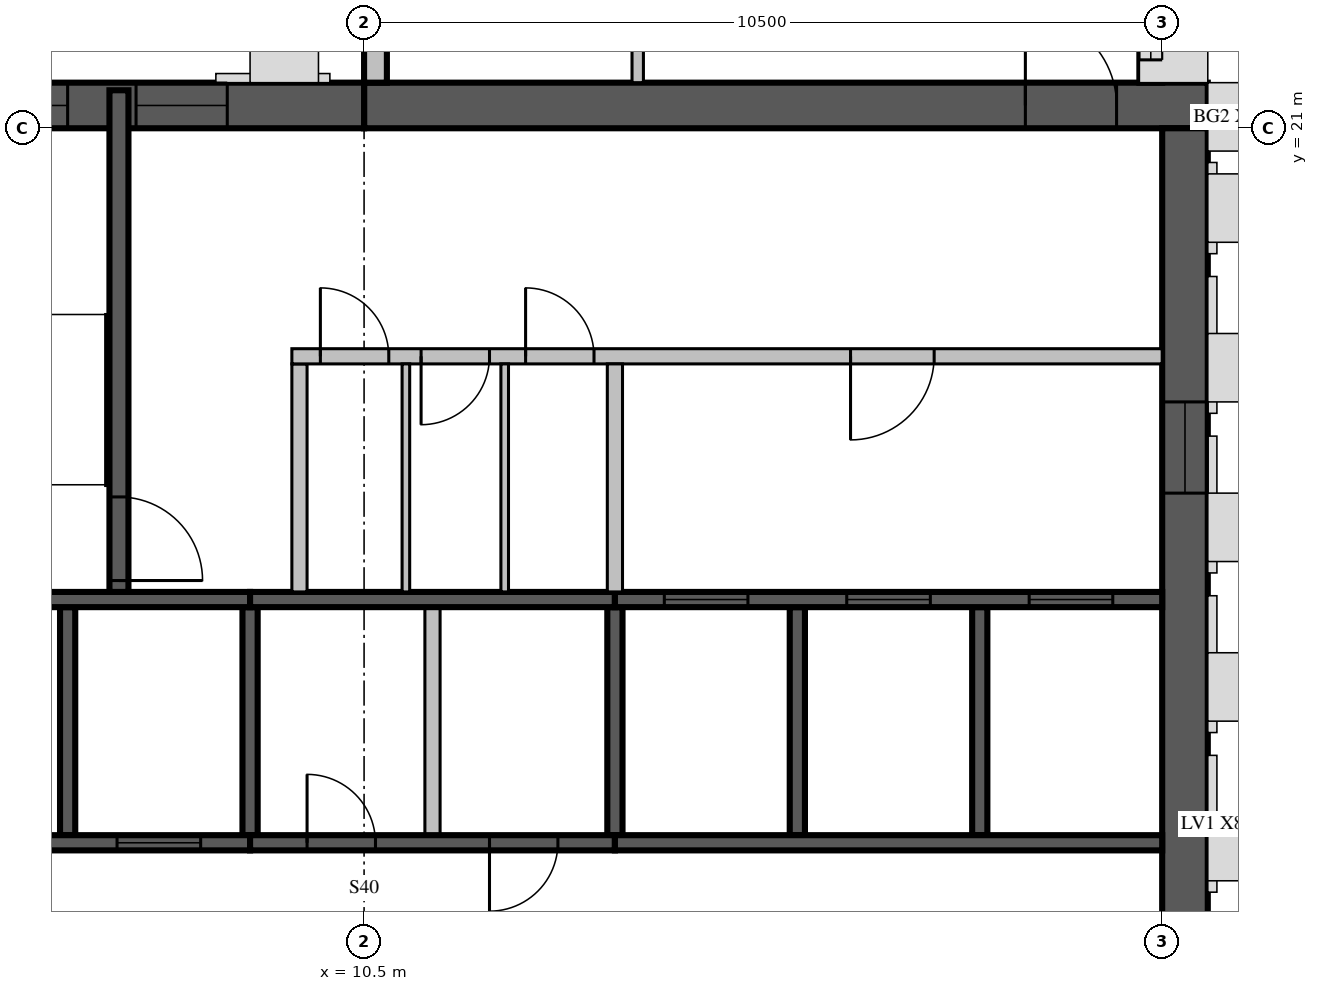
"""IFC4 building model, lengths in metres.
Left out: names, types, materials, properties, quantities, classifications, styles, units other than length and angle.
Written with IfcOpenShell. Run it as: python <this file> out.ifc"""

import sys

from ifc_helpers import new_model, si_unit, direction, frame, frame_2d, origin, place, context, subcontext, project, spatial, rectangle, extrude, source, transform, mapped, element, fill, save


model = new_model("IFC4")
c1 = context("Model", 3, precision=1e-05, world=origin(), true_north=direction((0.0, 1.0)))
c2 = subcontext(c1, "Body", "Model", "MODEL_VIEW")
j1 = project(units=[si_unit("LENGTHUNIT", "METRE"), si_unit("PLANEANGLEUNIT", "RADIAN")], contexts=[c1])
p1 = place(None, origin())
s1 = spatial("IfcSite", under=j1, at=p1, CompositionType="ELEMENT")
p2 = place(p1, origin())
s2 = spatial("IfcBuilding", under=s1, at=p2, CompositionType="ELEMENT")
p3 = place(p2, frame((0.0, 0.0, 358.0)))
s3 = spatial("IfcBuildingStorey", under=s2, at=p3, CompositionType="ELEMENT", Elevation=358.0)
m1 = source(origin(), c2, "Body", "SweptSolid", [
    extrude(rectangle(XDim=11.1, YDim=0.6, at=frame_2d((5.55, 0.0))), origin(), (0.0, 0.0, 1.0), 3.5),
])
p4 = place(p3, frame((10.5, 21.3, 0.0), z_axis=(0.0, 0.0, 1.0), x_axis=(1.0, 0.0, 0.0)))
e1 = element("IfcWall", 1, at=p4, inside=s3, PredefinedType="SHEAR", context=c2, shape_type="MappedRepresentation", body=[
    mapped(m1, transform((0.0, 0.0, 0.0), scale=1.0)),
])
m2 = source(origin(), c2, "Body", "SweptSolid", [
    extrude(rectangle(XDim=1.2, YDim=2.1, at=frame_2d((0.6, 1.05))), frame((0.0, 0.31, 0.0), z_axis=(0.0, -1.0, 0.0), x_axis=(1.0, 0.0, 0.0)), (0.0, 0.0, 1.0), 0.62),
])
p5 = place(p4, frame((8.7, 0.0, 0.0)))
e2 = element("IfcOpeningElement", 2, at=p5, cuts=e1, PredefinedType="OPENING", context=c2, shape_type="MappedRepresentation", body=[
    mapped(m2, transform((0.0, 0.0, 0.0), scale=1.0)),
])
m3 = source(origin(), c2, "Body", "SweptSolid", [
    extrude(rectangle(XDim=10.5, YDim=0.6, at=frame_2d((5.25, 0.0))), origin(), (0.0, 0.0, 1.0), 3.5),
])
p6 = place(p3, frame((21.3, 10.5, 0.0), z_axis=(0.0, 0.0, 1.0), x_axis=(0.0, 1.0, 0.0)))
e3 = element("IfcWall", 3, at=p6, inside=s3, PredefinedType="SHEAR", context=c2, shape_type="MappedRepresentation", body=[
    mapped(m3, transform((0.0, 0.0, 0.0), scale=1.0)),
])
m4 = source(origin(), c2, "Body", "SweptSolid", [
    extrude(rectangle(XDim=1.2, YDim=2.4, at=frame_2d((0.6, 1.2))), frame((0.0, 0.31, 0.0), z_axis=(0.0, -1.0, 0.0), x_axis=(1.0, 0.0, 0.0)), (0.0, 0.0, 1.0), 0.62),
])
p7 = place(p6, frame((5.7, 0.0, 0.6)))
e4 = element("IfcOpeningElement", 4, at=p7, cuts=e3, PredefinedType="OPENING", context=c2, shape_type="MappedRepresentation", body=[
    mapped(m4, transform((0.0, 0.0, 0.0), scale=1.0)),
])
m5 = source(origin(), c2, "Body", "SweptSolid", [
    extrude(rectangle(XDim=6.6, YDim=0.6, at=frame_2d((3.3, 0.0))), origin(), (0.0, 0.0, 1.0), 3.5),
])
p8 = place(p3, frame((3.9, 21.3, 0.0), z_axis=(0.0, 0.0, 1.0), x_axis=(1.0, 0.0, 0.0)))
e5 = element("IfcWall", 5, at=p8, inside=s3, PredefinedType="SHEAR", context=c2, shape_type="MappedRepresentation", body=[
    mapped(m5, transform((0.0, 0.0, 0.0), scale=1.0)),
])
p9 = place(p8, frame((1.5, 0.0, 0.6)))
e6 = element("IfcOpeningElement", 6, at=p9, cuts=e5, PredefinedType="OPENING", context=c2, shape_type="MappedRepresentation", body=[
    mapped(m4, transform((0.0, 0.0, 0.0), scale=1.0)),
])
p10 = place(p8, frame((3.6, 0.0, 0.6)))
e7 = element("IfcOpeningElement", 7, at=p10, cuts=e5, PredefinedType="OPENING", context=c2, shape_type="MappedRepresentation", body=[
    mapped(m4, transform((0.0, 0.0, 0.0), scale=1.0)),
])
m6 = source(origin(), c2, "Body", "SweptSolid", [
    extrude(rectangle(XDim=7.5, YDim=0.3, at=frame_2d((3.75, 0.0))), origin(), (0.0, 0.0, 1.0), 3.1),
])
p11 = place(p3, frame((20.85, 21.6, 0.0), z_axis=(0.0, 0.0, 1.0), x_axis=(0.0, 1.0, 0.0)))
e8 = element("IfcWall", 8, at=p11, inside=s3, PredefinedType="STANDARD", context=c2, shape_type="MappedRepresentation", body=[
    mapped(m6, transform((0.0, 0.0, 0.0), scale=1.0)),
])
m7 = source(origin(), c2, "Body", "SweptSolid", [
    extrude(rectangle(XDim=2.4, YDim=2.0, at=frame_2d((1.2, 1.0))), frame((0.0, 0.16, 0.0), z_axis=(0.0, -1.0, 0.0), x_axis=(1.0, 0.0, 0.0)), (0.0, 0.0, 1.0), 0.32),
])
p12 = place(p11, frame((0.3, 0.0, 0.6)))
e9 = element("IfcOpeningElement", 9, at=p12, cuts=e8, PredefinedType="OPENING", context=c2, shape_type="MappedRepresentation", body=[
    mapped(m7, transform((0.0, 0.0, 0.0), scale=1.0)),
])
m8 = source(origin(), c2, "Body", "SweptSolid", [
    extrude(rectangle(XDim=3.0, YDim=2.0, at=frame_2d((1.5, 1.0))), frame((0.0, 0.16, 0.0), z_axis=(0.0, -1.0, 0.0), x_axis=(1.0, 0.0, 0.0)), (0.0, 0.0, 1.0), 0.32),
])
p13 = place(p11, frame((4.2, 0.0, 0.6)))
e10 = element("IfcOpeningElement", 10, at=p13, cuts=e8, PredefinedType="OPENING", context=c2, shape_type="MappedRepresentation", body=[
    mapped(m8, transform((0.0, 0.0, 0.0), scale=1.0)),
])
m9 = source(origin(), c2, "Body", "SweptSolid", [
    extrude(rectangle(XDim=5.28, YDim=0.3, at=frame_2d((2.64, 0.0))), origin(), (0.0, 0.0, 1.0), 3.1),
])
p14 = place(p3, frame((10.65, 26.88, 0.0), z_axis=(0.0, 0.0, 1.0), x_axis=(0.0, -1.0, 0.0)))
e11 = element("IfcWall", 11, at=p14, inside=s3, PredefinedType="STANDARD", context=c2, shape_type="MappedRepresentation", body=[
    mapped(m9, transform((0.0, 0.0, 0.0), scale=1.0)),
])
m10 = source(origin(), c2, "Body", "SweptSolid", [
    extrude(rectangle(XDim=3.6, YDim=2.0, at=frame_2d((1.8, 1.0))), frame((0.0, 0.16, 0.0), z_axis=(0.0, -1.0, 0.0), x_axis=(1.0, 0.0, 0.0)), (0.0, 0.0, 1.0), 0.32),
])
p15 = place(p14, frame((1.14, 0.0, 0.6)))
e12 = element("IfcOpeningElement", 12, at=p15, cuts=e11, PredefinedType="OPENING", context=c2, shape_type="MappedRepresentation", body=[
    mapped(m10, transform((0.0, 0.0, 0.0), scale=1.0)),
])
m11 = source(origin(), c2, "Body", "SweptSolid", [
    extrude(rectangle(XDim=3.0, YDim=0.2, at=frame_2d((1.5, 0.0))), origin(), (0.0, 0.0, 1.0), 3.5),
])
p16 = place(p3, frame((6.6, 11.7, 0.0), z_axis=(0.0, 0.0, 1.0), x_axis=(0.0, 1.0, 0.0)))
e13 = element("IfcWall", 13, at=p16, inside=s3, PredefinedType="SOLIDWALL", context=c2, shape_type="MappedRepresentation", body=[
    mapped(m11, transform((0.0, 0.0, 0.0), scale=1.0)),
])
m12 = source(origin(), c2, "Body", "SweptSolid", [
    extrude(rectangle(XDim=3.0, YDim=0.2, at=frame_2d((1.5, 0.0))), origin(), (0.0, 0.0, 1.0), 3.1),
])
for number, where, z_axis, x_axis in (
    (14, (9.0, 11.7, 0.0), (0.0, 0.0, 1.0), (0.0, 1.0, 0.0)),
    (15, (13.8, 11.7, 0.0), (0.0, 0.0, 1.0), (0.0, 1.0, 0.0)),
):
    element("IfcWall", number, at=place(p3, frame(where, z_axis=z_axis, x_axis=x_axis)), inside=s3, PredefinedType="SOLIDWALL", context=c2, shape_type="MappedRepresentation", body=[
        mapped(m12, transform((0.0, 0.0, 0.0), scale=1.0)),
    ])
for number, where, z_axis, x_axis in (
    (16, (16.2, 11.7, 0.0), (0.0, 0.0, 1.0), (0.0, 1.0, 0.0)),
    (17, (18.6, 11.7, 0.0), (0.0, 0.0, 1.0), (0.0, 1.0, 0.0)),
):
    element("IfcWall", number, at=place(p3, frame(where, z_axis=z_axis, x_axis=x_axis)), inside=s3, PredefinedType="SOLIDWALL", context=c2, shape_type="MappedRepresentation", body=[
        mapped(m11, transform((0.0, 0.0, 0.0), scale=1.0)),
    ])
m13 = source(origin(), c2, "Body", "SweptSolid", [
    extrude(rectangle(XDim=3.0, YDim=0.2, at=frame_2d((1.5, 0.0))), origin(), (0.0, 0.0, 1.0), 3.1),
])
p17 = place(p3, frame((11.4, 11.7, 0.0), z_axis=(0.0, 0.0, 1.0), x_axis=(0.0, 1.0, 0.0)))
e18 = element("IfcWall", 18, at=p17, inside=s3, PredefinedType="PARTITIONING", context=c2, shape_type="MappedRepresentation", body=[
    mapped(m13, transform((0.0, 0.0, 0.0), scale=1.0)),
])
m14 = source(origin(), c2, "Body", "SweptSolid", [
    extrude(rectangle(XDim=4.8, YDim=0.2, at=frame_2d((2.4, 0.0))), origin(), (0.0, 0.0, 1.0), 3.5),
])
p18 = place(p3, frame((4.2, 11.6, 0.0), z_axis=(0.0, 0.0, 1.0), x_axis=(1.0, 0.0, 0.0)))
e19 = element("IfcWall", 19, at=p18, inside=s3, PredefinedType="SOLIDWALL", context=c2, shape_type="MappedRepresentation", body=[
    mapped(m14, transform((0.0, 0.0, 0.0), scale=1.0)),
])
m15 = source(origin(), c2, "Body", "SweptSolid", [
    extrude(rectangle(XDim=1.1, YDim=2.1, at=frame_2d((0.55, 1.05))), frame((0.0, 0.11, 0.0), z_axis=(0.0, -1.0, 0.0), x_axis=(1.0, 0.0, 0.0)), (0.0, 0.0, 1.0), 0.22),
])
p19 = place(p18, frame((0.65, 0.0, 0.0)))
e20 = element("IfcOpeningElement", 20, at=p19, cuts=e19, PredefinedType="OPENING", context=c2, shape_type="MappedRepresentation", body=[
    mapped(m15, transform((0.0, 0.0, 0.0), scale=1.0)),
])
p20 = place(p18, frame((3.05, 0.0, 0.0)))
e21 = element("IfcOpeningElement", 21, at=p20, cuts=e19, PredefinedType="OPENING", context=c2, shape_type="MappedRepresentation", body=[
    mapped(m15, transform((0.0, 0.0, 0.0), scale=1.0)),
])
m16 = source(origin(), c2, "Body", "SweptSolid", [
    extrude(rectangle(XDim=4.8, YDim=0.2, at=frame_2d((2.4, 0.0))), origin(), (0.0, 0.0, 1.0), 3.1),
])
p21 = place(p3, frame((9.0, 11.6, 0.0), z_axis=(0.0, 0.0, 1.0), x_axis=(1.0, 0.0, 0.0)))
e22 = element("IfcWall", 22, at=p21, inside=s3, PredefinedType="SOLIDWALL", context=c2, shape_type="MappedRepresentation", body=[
    mapped(m16, transform((0.0, 0.0, 0.0), scale=1.0)),
])
m17 = source(origin(), c2, "Body", "SweptSolid", [
    extrude(rectangle(XDim=0.9, YDim=2.1, at=frame_2d((0.45, 1.05))), frame((0.0, 0.11, 0.0), z_axis=(0.0, -1.0, 0.0), x_axis=(1.0, 0.0, 0.0)), (0.0, 0.0, 1.0), 0.22),
])
p22 = place(p21, frame((0.75, 0.0, 0.0)))
e23 = element("IfcOpeningElement", 23, at=p22, cuts=e22, PredefinedType="OPENING", context=c2, shape_type="MappedRepresentation", body=[
    mapped(m17, transform((0.0, 0.0, 0.0), scale=1.0)),
])
p23 = place(p21, frame((3.15, 0.0, 0.0)))
e24 = element("IfcOpeningElement", 24, at=p23, cuts=e22, PredefinedType="OPENING", context=c2, shape_type="MappedRepresentation", body=[
    mapped(m17, transform((0.0, 0.0, 0.0), scale=1.0)),
])
m18 = source(origin(), c2, "Body", "SweptSolid", [
    extrude(rectangle(XDim=7.2, YDim=0.2, at=frame_2d((3.6, 0.0))), origin(), (0.0, 0.0, 1.0), 3.5),
])
p24 = place(p3, frame((13.8, 11.6, 0.0), z_axis=(0.0, 0.0, 1.0), x_axis=(1.0, 0.0, 0.0)))
e25 = element("IfcWall", 25, at=p24, inside=s3, PredefinedType="SOLIDWALL", context=c2, shape_type="MappedRepresentation", body=[
    mapped(m18, transform((0.0, 0.0, 0.0), scale=1.0)),
])
p25 = place(p3, frame((4.2, 14.8, 0.0), z_axis=(0.0, 0.0, 1.0), x_axis=(1.0, 0.0, 0.0)))
e26 = element("IfcWall", 26, at=p25, inside=s3, PredefinedType="SOLIDWALL", context=c2, shape_type="MappedRepresentation", body=[
    mapped(m14, transform((0.0, 0.0, 0.0), scale=1.0)),
])
p26 = place(p3, frame((9.0, 14.8, 0.0), z_axis=(0.0, 0.0, 1.0), x_axis=(1.0, 0.0, 0.0)))
e27 = element("IfcWall", 27, at=p26, inside=s3, PredefinedType="SOLIDWALL", context=c2, shape_type="MappedRepresentation", body=[
    mapped(m16, transform((0.0, 0.0, 0.0), scale=1.0)),
])
p27 = place(p3, frame((13.8, 14.8, 0.0), z_axis=(0.0, 0.0, 1.0), x_axis=(1.0, 0.0, 0.0)))
e28 = element("IfcWall", 28, at=p27, inside=s3, PredefinedType="SOLIDWALL", context=c2, shape_type="MappedRepresentation", body=[
    mapped(m18, transform((0.0, 0.0, 0.0), scale=1.0)),
])
p28 = place(p27, frame((0.65, 0.0, 0.0)))
e29 = element("IfcOpeningElement", 29, at=p28, cuts=e28, PredefinedType="OPENING", context=c2, shape_type="MappedRepresentation", body=[
    mapped(m15, transform((0.0, 0.0, 0.0), scale=1.0)),
])
p29 = place(p27, frame((3.05, 0.0, 0.0)))
e30 = element("IfcOpeningElement", 30, at=p29, cuts=e28, PredefinedType="OPENING", context=c2, shape_type="MappedRepresentation", body=[
    mapped(m15, transform((0.0, 0.0, 0.0), scale=1.0)),
])
p30 = place(p27, frame((5.45, 0.0, 0.0)))
e31 = element("IfcOpeningElement", 31, at=p30, cuts=e28, PredefinedType="OPENING", context=c2, shape_type="MappedRepresentation", body=[
    mapped(m15, transform((0.0, 0.0, 0.0), scale=1.0)),
])
m19 = source(origin(), c2, "Body", "SweptSolid", [
    extrude(rectangle(XDim=6.6, YDim=0.25, at=frame_2d((3.3, 0.0))), origin(), (0.0, 0.0, 1.0), 3.1),
])
p31 = place(p3, frame((7.275, 14.9, 0.0), z_axis=(0.0, 0.0, 1.0), x_axis=(0.0, 1.0, 0.0)))
e32 = element("IfcWall", 32, at=p31, inside=s3, PredefinedType="SOLIDWALL", context=c2, shape_type="MappedRepresentation", body=[
    mapped(m19, transform((0.0, 0.0, 0.0), scale=1.0)),
])
m20 = source(origin(), c2, "Body", "SweptSolid", [
    extrude(rectangle(XDim=1.1, YDim=2.1, at=frame_2d((0.55, 1.05))), frame((0.0, 0.135, 0.0), z_axis=(0.0, -1.0, 0.0), x_axis=(1.0, 0.0, 0.0)), (0.0, 0.0, 1.0), 0.27),
])
p32 = place(p31, frame((0.15, 0.0, 0.0)))
e33 = element("IfcOpeningElement", 33, at=p32, cuts=e32, PredefinedType="OPENING", context=c2, shape_type="MappedRepresentation", body=[
    mapped(m20, transform((0.0, 0.0, 0.0), scale=1.0)),
])
p33 = place(p3, frame((9.65, 14.9, 0.0), z_axis=(0.0, 0.0, 1.0), x_axis=(0.0, 1.0, 0.0)))
e34 = element("IfcWall", 34, at=p33, inside=s3, PredefinedType="PARTITIONING", context=c2, shape_type="MappedRepresentation", body=[
    mapped(m13, transform((0.0, 0.0, 0.0), scale=1.0)),
])
m21 = source(origin(), c2, "Body", "SweptSolid", [
    extrude(rectangle(XDim=11.45, YDim=0.2, at=frame_2d((5.725, 0.0))), origin(), (0.0, 0.0, 1.0), 3.1),
])
p34 = place(p3, frame((9.55, 18.0, 0.0), z_axis=(0.0, 0.0, 1.0), x_axis=(1.0, 0.0, 0.0)))
e35 = element("IfcWall", 35, at=p34, inside=s3, PredefinedType="PARTITIONING", context=c2, shape_type="MappedRepresentation", body=[
    mapped(m21, transform((0.0, 0.0, 0.0), scale=1.0)),
])
p35 = place(p34, frame((0.375, 0.0, 0.0)))
e36 = element("IfcOpeningElement", 36, at=p35, cuts=e35, PredefinedType="OPENING", context=c2, shape_type="MappedRepresentation", body=[
    mapped(m17, transform((0.0, 0.0, 0.0), scale=1.0)),
])
p36 = place(p34, frame((1.7, 0.0, 0.0)))
e37 = element("IfcOpeningElement", 37, at=p36, cuts=e35, PredefinedType="OPENING", context=c2, shape_type="MappedRepresentation", body=[
    mapped(m17, transform((0.0, 0.0, 0.0), scale=1.0)),
])
p37 = place(p34, frame((3.075, 0.0, 0.0)))
e38 = element("IfcOpeningElement", 38, at=p37, cuts=e35, PredefinedType="OPENING", context=c2, shape_type="MappedRepresentation", body=[
    mapped(m17, transform((0.0, 0.0, 0.0), scale=1.0)),
])
p38 = place(p34, frame((7.35, 0.0, 0.0)))
e39 = element("IfcOpeningElement", 39, at=p38, cuts=e35, PredefinedType="OPENING", context=c2, shape_type="MappedRepresentation", body=[
    mapped(m15, transform((0.0, 0.0, 0.0), scale=1.0)),
])
p39 = place(p3, frame((13.8, 14.9, 0.0), z_axis=(0.0, 0.0, 1.0), x_axis=(0.0, 1.0, 0.0)))
e40 = element("IfcWall", 40, at=p39, inside=s3, PredefinedType="PARTITIONING", context=c2, shape_type="MappedRepresentation", body=[
    mapped(m13, transform((0.0, 0.0, 0.0), scale=1.0)),
])
m22 = source(origin(), c2, "Body", "SweptSolid", [
    extrude(rectangle(XDim=3.0, YDim=0.1, at=frame_2d((1.5, 0.0))), origin(), (0.0, 0.0, 1.0), 3.1),
])
for number, where, z_axis, x_axis in (
    (41, (11.05, 14.9, 0.0), (0.0, 0.0, 1.0), (0.0, 1.0, 0.0)),
    (42, (12.35, 14.9, 0.0), (0.0, 0.0, 1.0), (0.0, 1.0, 0.0)),
):
    element("IfcWall", number, at=place(p3, frame(where, z_axis=z_axis, x_axis=x_axis)), inside=s3, PredefinedType="PARTITIONING", context=c2, shape_type="MappedRepresentation", body=[
        mapped(m22, transform((0.0, 0.0, 0.0), scale=1.0)),
    ])
m23 = source(origin(), c2, "Body", "SweptSolid", [
    extrude(rectangle(XDim=7.725, YDim=0.15, at=frame_2d((3.862, 0.0))), origin(), (0.0, 0.0, 1.0), 3.1),
])
p40 = place(p3, frame((14.1, 29.325, 0.0), z_axis=(0.0, 0.0, 1.0), x_axis=(0.0, -1.0, 0.0)))
e43 = element("IfcWall", 43, at=p40, inside=s3, PredefinedType="PARTITIONING", context=c2, shape_type="MappedRepresentation", body=[
    mapped(m23, transform((0.0, 0.0, 0.0), scale=1.0)),
])
m24 = source(origin(), c2, "Body", "SweptSolid", [
    extrude(rectangle(XDim=2.2, YDim=2.1, at=frame_2d((1.1, 1.05))), frame((0.0, 0.085, 0.0), z_axis=(0.0, -1.0, 0.0), x_axis=(1.0, 0.0, 0.0)), (0.0, 0.0, 1.0), 0.17),
])
p41 = place(p40, frame((4.925, 0.0, 0.0)))
e44 = element("IfcOpeningElement", 44, at=p41, cuts=e43, PredefinedType="OPENING", context=c2, shape_type="MappedRepresentation", body=[
    mapped(m24, transform((0.0, 0.0, 0.0), scale=1.0)),
])
m25 = source(origin(), c2, "Body", "SweptSolid", [
    extrude(rectangle(XDim=2.4, YDim=2.0, at=frame_2d((1.2, 1.0))), frame((0.0, 0.03, 0.0), z_axis=(0.0, -1.0, 0.0), x_axis=(1.0, 0.0, 0.0)), (0.0, 0.0, 1.0), 0.06),
])
p42 = place(p12, origin())
e45 = element("IfcWindow", 45, at=p42, inside=s3, PartitioningType="SINGLE_PANEL", PredefinedType="WINDOW", context=c2, shape_type="MappedRepresentation", body=[
    mapped(m25, transform((0.0, 0.0, 0.0), scale=1.0)),
])
fill(e9, e45)
m26 = source(origin(), c2, "Body", "SweptSolid", [
    extrude(rectangle(XDim=1.1, YDim=2.1, at=frame_2d((0.55, 1.05))), frame((0.0, 0.025, 0.0), z_axis=(0.0, -1.0, 0.0), x_axis=(1.0, 0.0, 0.0)), (0.0, 0.0, 1.0), 0.05),
])
p43 = place(p20, origin())
e46 = element("IfcDoor", 46, at=p43, inside=s3, OperationType="SLIDING_TO_LEFT", PredefinedType="DOOR", context=c2, shape_type="MappedRepresentation", body=[
    mapped(m26, transform((0.0, 0.0, 0.0), scale=1.0)),
])
fill(e21, e46)
m27 = source(origin(), c2, "Body", "SweptSolid", [
    extrude(rectangle(XDim=0.9, YDim=2.1, at=frame_2d((0.45, 1.05))), frame((0.0, 0.025, 0.0), z_axis=(0.0, -1.0, 0.0), x_axis=(1.0, 0.0, 0.0)), (0.0, 0.0, 1.0), 0.05),
])
p44 = place(p22, origin())
e47 = element("IfcDoor", 47, at=p44, inside=s3, OperationType="SINGLE_SWING_LEFT", PredefinedType="DOOR", context=c2, shape_type="MappedRepresentation", body=[
    mapped(m27, transform((0.0, 0.0, 0.0), scale=1.0)),
])
fill(e23, e47)
p45 = place(p23, origin())
e48 = element("IfcDoor", 48, at=p45, inside=s3, OperationType="SINGLE_SWING_RIGHT", PredefinedType="DOOR", context=c2, shape_type="MappedRepresentation", body=[
    mapped(m27, transform((0.0, 0.0, 0.0), scale=1.0)),
])
fill(e24, e48)
p46 = place(p28, origin())
e49 = element("IfcDoor", 49, at=p46, inside=s3, OperationType="SLIDING_TO_LEFT", PredefinedType="DOOR", context=c2, shape_type="MappedRepresentation", body=[
    mapped(m26, transform((0.0, 0.0, 0.0), scale=1.0)),
])
fill(e29, e49)
p47 = place(p29, origin())
e50 = element("IfcDoor", 50, at=p47, inside=s3, OperationType="SLIDING_TO_LEFT", PredefinedType="DOOR", context=c2, shape_type="MappedRepresentation", body=[
    mapped(m26, transform((0.0, 0.0, 0.0), scale=1.0)),
])
fill(e30, e50)
p48 = place(p30, origin())
e51 = element("IfcDoor", 51, at=p48, inside=s3, OperationType="SLIDING_TO_LEFT", PredefinedType="DOOR", context=c2, shape_type="MappedRepresentation", body=[
    mapped(m26, transform((0.0, 0.0, 0.0), scale=1.0)),
])
fill(e31, e51)
p49 = place(p32, origin())
e52 = element("IfcDoor", 52, at=p49, inside=s3, OperationType="SINGLE_SWING_RIGHT", PredefinedType="DOOR", context=c2, shape_type="MappedRepresentation", body=[
    mapped(m26, transform((0.0, 0.0, 0.0), scale=1.0)),
])
fill(e33, e52)
p50 = place(p35, origin())
e53 = element("IfcDoor", 53, at=p50, inside=s3, OperationType="SINGLE_SWING_LEFT", PredefinedType="DOOR", context=c2, shape_type="MappedRepresentation", body=[
    mapped(m27, transform((0.0, 0.0, 0.0), scale=1.0)),
])
fill(e36, e53)
p51 = place(p36, origin())
e54 = element("IfcDoor", 54, at=p51, inside=s3, OperationType="SINGLE_SWING_RIGHT", PredefinedType="DOOR", context=c2, shape_type="MappedRepresentation", body=[
    mapped(m27, transform((0.0, 0.0, 0.0), scale=1.0)),
])
fill(e37, e54)
p52 = place(p37, origin())
e55 = element("IfcDoor", 55, at=p52, inside=s3, OperationType="SINGLE_SWING_LEFT", PredefinedType="DOOR", context=c2, shape_type="MappedRepresentation", body=[
    mapped(m27, transform((0.0, 0.0, 0.0), scale=1.0)),
])
fill(e38, e55)
p53 = place(p38, origin())
e56 = element("IfcDoor", 56, at=p53, inside=s3, OperationType="SINGLE_SWING_RIGHT", PredefinedType="DOOR", context=c2, shape_type="MappedRepresentation", body=[
    mapped(m26, transform((0.0, 0.0, 0.0), scale=1.0)),
])
fill(e39, e56)
m28 = source(origin(), c2, "Body", "SweptSolid", [
    extrude(rectangle(XDim=1.2, YDim=2.1, at=frame_2d((0.6, 1.05))), frame((0.0, 0.025, 0.0), z_axis=(0.0, -1.0, 0.0), x_axis=(1.0, 0.0, 0.0)), (0.0, 0.0, 1.0), 0.05),
])
p54 = place(p5, origin())
e57 = element("IfcDoor", 57, at=p54, inside=s3, OperationType="SINGLE_SWING_LEFT", PredefinedType="DOOR", context=c2, shape_type="MappedRepresentation", body=[
    mapped(m28, transform((0.0, 0.0, 0.0), scale=1.0)),
])
fill(e2, e57)
m29 = source(origin(), c2, "Body", "SweptSolid", [
    extrude(rectangle(XDim=1.2, YDim=2.4, at=frame_2d((0.6, 1.2))), frame((0.0, 0.03, 0.0), z_axis=(0.0, -1.0, 0.0), x_axis=(1.0, 0.0, 0.0)), (0.0, 0.0, 1.0), 0.06),
])
p55 = place(p7, origin())
e58 = element("IfcWindow", 58, at=p55, inside=s3, PartitioningType="SINGLE_PANEL", PredefinedType="WINDOW", context=c2, shape_type="MappedRepresentation", body=[
    mapped(m29, transform((0.0, 0.0, 0.0), scale=1.0)),
])
fill(e4, e58)
p56 = place(p9, origin())
e59 = element("IfcWindow", 59, at=p56, inside=s3, PartitioningType="SINGLE_PANEL", PredefinedType="WINDOW", context=c2, shape_type="MappedRepresentation", body=[
    mapped(m29, transform((0.0, 0.0, 0.0), scale=1.0)),
])
fill(e6, e59)
p57 = place(p10, origin())
e60 = element("IfcWindow", 60, at=p57, inside=s3, PartitioningType="SINGLE_PANEL", PredefinedType="WINDOW", context=c2, shape_type="MappedRepresentation", body=[
    mapped(m29, transform((0.0, 0.0, 0.0), scale=1.0)),
])
fill(e7, e60)
save(model, sys.argv[1])
